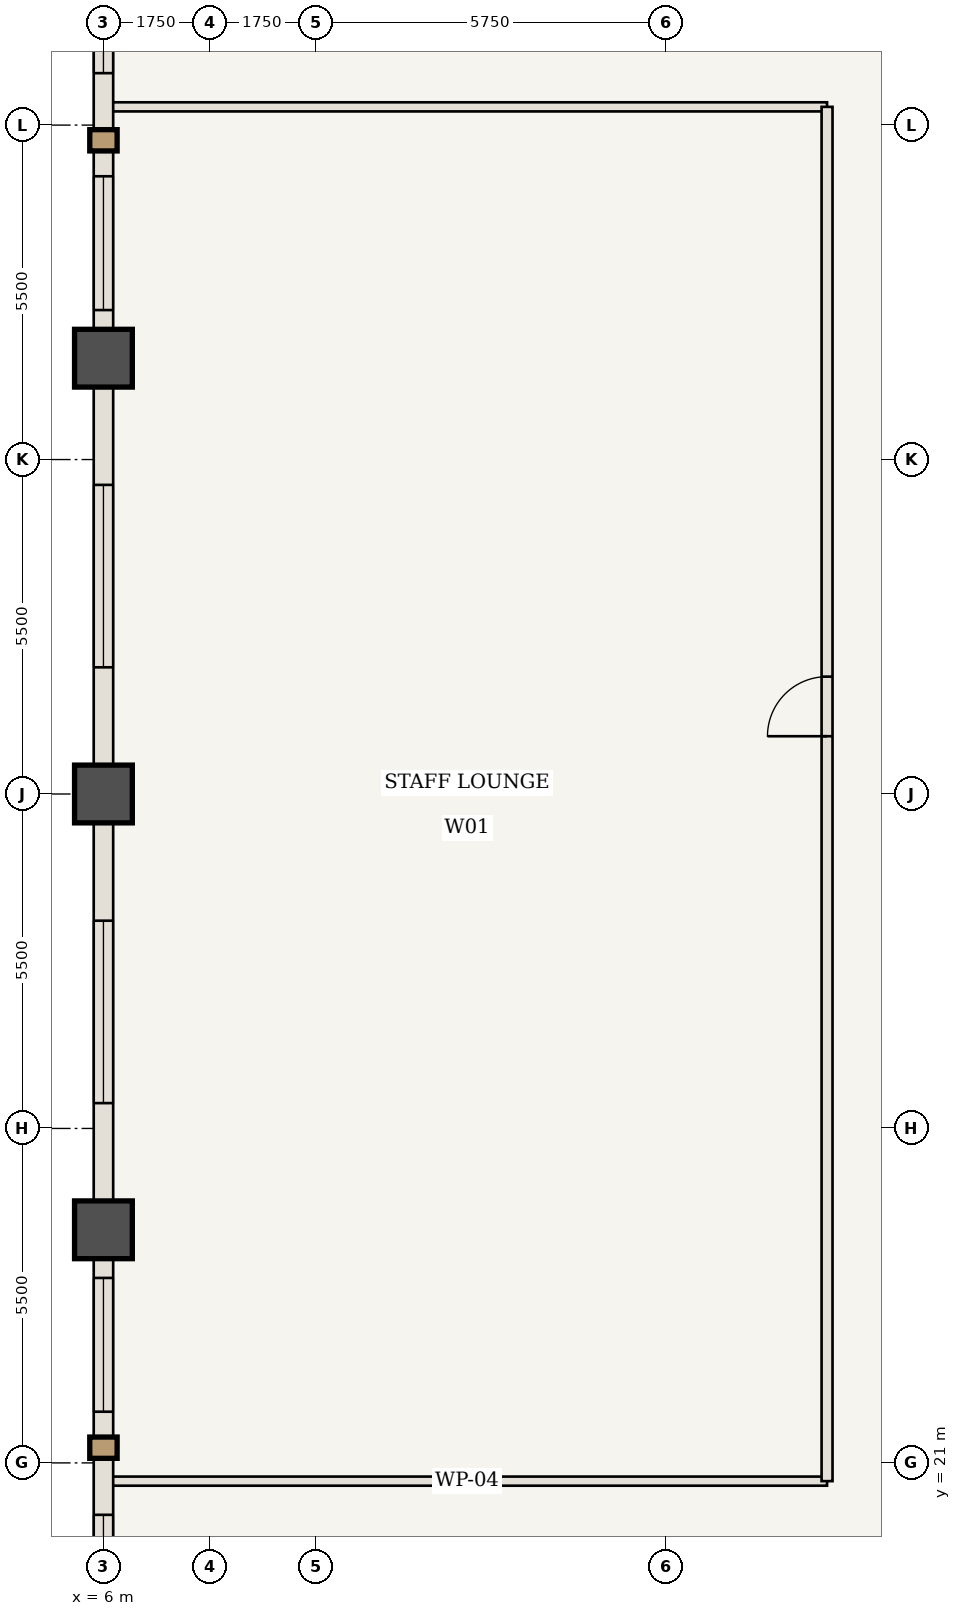
"""IFC4 building model, lengths in metres.
Left out: names, types, materials, properties, quantities, classifications, styles, units other than length and angle.
Written with IfcOpenShell. Run it as: python <this file> out.ifc"""

import sys

from ifc_helpers import new_model, si_unit, direction, frame, frame_2d, origin, origin_2d, place, context, subcontext, project, spatial, rectangle, extrude, element, fill, save


model = new_model("IFC4")
c1 = context("Model", 3, precision=1e-05, world=origin(), true_north=direction((0.0, 1.0)))
c2 = subcontext(c1, "Body", "Model", "MODEL_VIEW")
j1 = project(units=[si_unit("LENGTHUNIT", "METRE"), si_unit("PLANEANGLEUNIT", "RADIAN")], contexts=[c1])
p1 = place(None, origin())
s1 = spatial("IfcSite", under=j1, at=p1, CompositionType="ELEMENT")
p2 = place(p1, origin())
s2 = spatial("IfcBuilding", under=s1, at=p2, CompositionType="ELEMENT")
p3 = place(p2, frame((0.0, 0.0, 145.25)))
s3 = spatial("IfcBuildingStorey", under=s2, at=p3, CompositionType="ELEMENT", Elevation=145.25)
for number, where, z_axis, x_axis in (
    (1, (6.0, 24.833, 0.0), (0.0, 0.0, 1.0), (1.0, 0.0, 0.0)),
    (2, (6.0, 32.0, 0.0), (0.0, 0.0, 1.0), (1.0, 0.0, 0.0)),
    (3, (6.0, 39.167, 0.0), (0.0, 0.0, 1.0), (1.0, 0.0, 0.0)),
):
    element("IfcColumn", number, at=place(p3, frame(where, z_axis=z_axis, x_axis=x_axis)), inside=s3, PredefinedType="COLUMN", context=c2, shape_type="SweptSolid", body=[
        extrude(rectangle(XDim=0.95, YDim=0.95, at=origin_2d()), origin(), (0.0, 0.0, 1.0), 3.85),
    ])
for number, where, z_axis, x_axis in (
    (4, (6.06, 20.7, 0.0), (0.0, 0.0, 1.0), (1.0, 0.0, 0.0)),
    (5, (6.06, 43.3, 0.0), (0.0, 0.0, 1.0), (1.0, 0.0, 0.0)),
):
    element("IfcWall", number, at=place(p3, frame(where, z_axis=z_axis, x_axis=x_axis)), inside=s3, PredefinedType="STANDARD", context=c2, shape_type="SweptSolid", body=[
        extrude(rectangle(XDim=11.84, YDim=0.15, at=frame_2d((5.92, 0.0))), origin(), (0.0, 0.0, 1.0), 3.056),
    ])
p4 = place(p3, frame((17.9, 20.7, 0.0), z_axis=(0.0, 0.0, 1.0), x_axis=(0.0, 1.0, 0.0)))
e6 = element("IfcWall", 6, at=p4, inside=s3, PredefinedType="STANDARD", context=c2, shape_type="SweptSolid", body=[
    extrude(rectangle(XDim=22.6, YDim=0.18, at=frame_2d((11.3, 0.0))), origin(), (0.0, 0.0, 1.0), 3.685),
])
p5 = place(p4, frame((12.25, 0.0, 0.0)))
e7 = element("IfcOpeningElement", 7, at=p5, cuts=e6, PredefinedType="OPENING", context=c2, shape_type="SweptSolid", body=[
    extrude(rectangle(XDim=0.98, YDim=2.2, at=frame_2d((0.49, 1.1))), frame((0.0, 0.1, 0.0), z_axis=(0.0, -1.0, 0.0), x_axis=(1.0, 0.0, 0.0)), (0.0, 0.0, 1.0), 0.2),
])
p6 = place(p3, frame((6.0, 17.667, 0.0), z_axis=(0.0, 0.0, 1.0), x_axis=(0.0, 1.0, 0.0)))
e8 = element("IfcWall", 8, at=p6, inside=s3, PredefinedType="USERDEFINED", context=c2, shape_type="SweptSolid", body=[
    extrude(rectangle(XDim=7.167, YDim=0.32, at=frame_2d((3.583, 0.0))), origin(), (0.0, 0.0, 1.0), 2.885),
])
p7 = place(p6, frame((0.879, 0.0, 0.85)))
e9 = element("IfcOpeningElement", 9, at=p7, cuts=e8, PredefinedType="OPENING", context=c2, shape_type="SweptSolid", body=[
    extrude(rectangle(XDim=1.6, YDim=1.835, at=frame_2d((0.8, 0.917))), frame((0.0, 0.17, 0.0), z_axis=(0.0, -1.0, 0.0), x_axis=(1.0, 0.0, 0.0)), (0.0, 0.0, 1.0), 0.34),
])
p8 = place(p6, frame((4.175, 0.0, 0.85)))
e10 = element("IfcOpeningElement", 10, at=p8, cuts=e8, PredefinedType="OPENING", context=c2, shape_type="SweptSolid", body=[
    extrude(rectangle(XDim=2.2, YDim=1.835, at=frame_2d((1.1, 0.917))), frame((0.0, 0.17, 0.0), z_axis=(0.0, -1.0, 0.0), x_axis=(1.0, 0.0, 0.0)), (0.0, 0.0, 1.0), 0.34),
])
p9 = place(p3, frame((6.0, 24.833, 0.0), z_axis=(0.0, 0.0, 1.0), x_axis=(0.0, 1.0, 0.0)))
e11 = element("IfcWall", 11, at=p9, inside=s3, PredefinedType="USERDEFINED", context=c2, shape_type="SweptSolid", body=[
    extrude(rectangle(XDim=7.167, YDim=0.32, at=frame_2d((3.583, 0.0))), origin(), (0.0, 0.0, 1.0), 2.885),
])
p10 = place(p9, frame((2.083, 0.0, 0.85)))
e12 = element("IfcOpeningElement", 12, at=p10, cuts=e11, PredefinedType="OPENING", context=c2, shape_type="SweptSolid", body=[
    extrude(rectangle(XDim=3.0, YDim=1.835, at=frame_2d((1.5, 0.917))), frame((0.0, 0.17, 0.0), z_axis=(0.0, -1.0, 0.0), x_axis=(1.0, 0.0, 0.0)), (0.0, 0.0, 1.0), 0.34),
])
p11 = place(p3, frame((6.0, 32.0, 0.0), z_axis=(0.0, 0.0, 1.0), x_axis=(0.0, 1.0, 0.0)))
e13 = element("IfcWall", 13, at=p11, inside=s3, PredefinedType="USERDEFINED", context=c2, shape_type="SweptSolid", body=[
    extrude(rectangle(XDim=7.167, YDim=0.32, at=frame_2d((3.583, 0.0))), origin(), (0.0, 0.0, 1.0), 2.885),
])
p12 = place(p11, frame((2.083, 0.0, 0.85)))
e14 = element("IfcOpeningElement", 14, at=p12, cuts=e13, PredefinedType="OPENING", context=c2, shape_type="SweptSolid", body=[
    extrude(rectangle(XDim=3.0, YDim=1.835, at=frame_2d((1.5, 0.917))), frame((0.0, 0.17, 0.0), z_axis=(0.0, -1.0, 0.0), x_axis=(1.0, 0.0, 0.0)), (0.0, 0.0, 1.0), 0.34),
])
p13 = place(p3, frame((6.0, 39.167, 0.0), z_axis=(0.0, 0.0, 1.0), x_axis=(0.0, 1.0, 0.0)))
e15 = element("IfcWall", 15, at=p13, inside=s3, PredefinedType="USERDEFINED", context=c2, shape_type="SweptSolid", body=[
    extrude(rectangle(XDim=7.167, YDim=0.32, at=frame_2d((3.583, 0.0))), origin(), (0.0, 0.0, 1.0), 2.885),
])
p14 = place(p13, frame((0.792, 0.0, 0.85)))
e16 = element("IfcOpeningElement", 16, at=p14, cuts=e15, PredefinedType="OPENING", context=c2, shape_type="SweptSolid", body=[
    extrude(rectangle(XDim=2.2, YDim=1.835, at=frame_2d((1.1, 0.917))), frame((0.0, 0.17, 0.0), z_axis=(0.0, -1.0, 0.0), x_axis=(1.0, 0.0, 0.0)), (0.0, 0.0, 1.0), 0.34),
])
p15 = place(p13, frame((4.688, 0.0, 0.85)))
e17 = element("IfcOpeningElement", 17, at=p15, cuts=e15, PredefinedType="OPENING", context=c2, shape_type="SweptSolid", body=[
    extrude(rectangle(XDim=1.6, YDim=1.835, at=frame_2d((0.8, 0.917))), frame((0.0, 0.17, 0.0), z_axis=(0.0, -1.0, 0.0), x_axis=(1.0, 0.0, 0.0)), (0.0, 0.0, 1.0), 0.34),
])
p16 = place(p5, origin())
e18 = element("IfcDoor", 18, at=p16, inside=s3, OperationType="SINGLE_SWING_LEFT", PredefinedType="DOOR", context=c2, shape_type="SweptSolid", body=[
    extrude(rectangle(XDim=0.98, YDim=2.2, at=frame_2d((0.49, 1.1))), frame((0.0, 0.025, 0.0), z_axis=(0.0, -1.0, 0.0), x_axis=(1.0, 0.0, 0.0)), (0.0, 0.0, 1.0), 0.05),
])
fill(e7, e18)
p17 = place(p7, origin())
e19 = element("IfcWindow", 19, at=p17, inside=s3, PartitioningType="SINGLE_PANEL", PredefinedType="WINDOW", context=c2, shape_type="SweptSolid", body=[
    extrude(rectangle(XDim=1.6, YDim=1.835, at=frame_2d((0.8, 0.917))), frame((0.0, 0.03, 0.0), z_axis=(0.0, -1.0, 0.0), x_axis=(1.0, 0.0, 0.0)), (0.0, 0.0, 1.0), 0.06),
])
fill(e9, e19)
p18 = place(p8, origin())
e20 = element("IfcWindow", 20, at=p18, inside=s3, PartitioningType="SINGLE_PANEL", PredefinedType="WINDOW", context=c2, shape_type="SweptSolid", body=[
    extrude(rectangle(XDim=2.2, YDim=1.835, at=frame_2d((1.1, 0.917))), frame((0.0, 0.03, 0.0), z_axis=(0.0, -1.0, 0.0), x_axis=(1.0, 0.0, 0.0)), (0.0, 0.0, 1.0), 0.06),
])
fill(e10, e20)
p19 = place(p10, origin())
e21 = element("IfcWindow", 21, at=p19, inside=s3, PartitioningType="SINGLE_PANEL", PredefinedType="WINDOW", context=c2, shape_type="SweptSolid", body=[
    extrude(rectangle(XDim=3.0, YDim=1.835, at=frame_2d((1.5, 0.917))), frame((0.0, 0.03, 0.0), z_axis=(0.0, -1.0, 0.0), x_axis=(1.0, 0.0, 0.0)), (0.0, 0.0, 1.0), 0.06),
])
fill(e12, e21)
p20 = place(p12, origin())
e22 = element("IfcWindow", 22, at=p20, inside=s3, PartitioningType="SINGLE_PANEL", PredefinedType="WINDOW", context=c2, shape_type="SweptSolid", body=[
    extrude(rectangle(XDim=3.0, YDim=1.835, at=frame_2d((1.5, 0.917))), frame((0.0, 0.03, 0.0), z_axis=(0.0, -1.0, 0.0), x_axis=(1.0, 0.0, 0.0)), (0.0, 0.0, 1.0), 0.06),
])
fill(e14, e22)
p21 = place(p14, origin())
e23 = element("IfcWindow", 23, at=p21, inside=s3, PartitioningType="SINGLE_PANEL", PredefinedType="WINDOW", context=c2, shape_type="SweptSolid", body=[
    extrude(rectangle(XDim=2.2, YDim=1.835, at=frame_2d((1.1, 0.917))), frame((0.0, 0.03, 0.0), z_axis=(0.0, -1.0, 0.0), x_axis=(1.0, 0.0, 0.0)), (0.0, 0.0, 1.0), 0.06),
])
fill(e16, e23)
p22 = place(p15, origin())
e24 = element("IfcWindow", 24, at=p22, inside=s3, PartitioningType="SINGLE_PANEL", PredefinedType="WINDOW", context=c2, shape_type="SweptSolid", body=[
    extrude(rectangle(XDim=1.6, YDim=1.835, at=frame_2d((0.8, 0.917))), frame((0.0, 0.03, 0.0), z_axis=(0.0, -1.0, 0.0), x_axis=(1.0, 0.0, 0.0)), (0.0, 0.0, 1.0), 0.06),
])
fill(e17, e24)
save(model, sys.argv[1])
